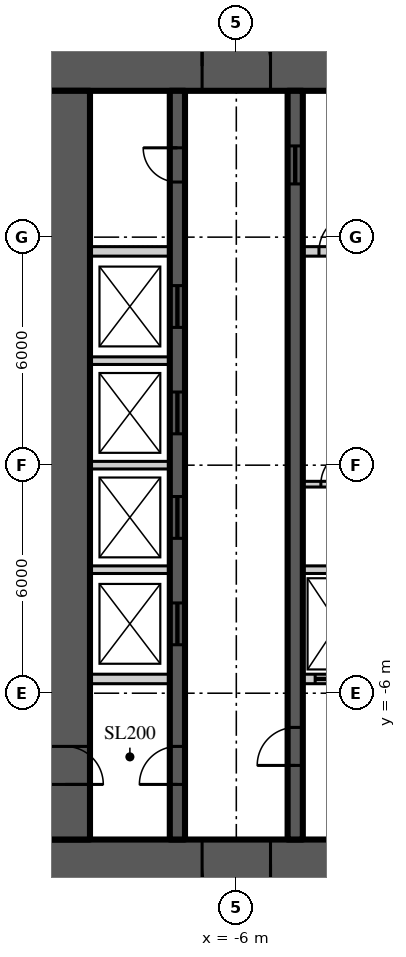
"""IFC4 building model, lengths in metres.
Left out: names, types, materials, properties, quantities, classifications, styles, units other than length and angle.
Written with IfcOpenShell. Run it as: python <this file> out.ifc"""

import sys

from ifc_helpers import new_model, si_unit, direction, frame, frame_2d, origin, place, context, subcontext, project, spatial, rectangle, extrude, element, fill, save


model = new_model("IFC4")
c1 = context("Model", 3, precision=1e-05, world=origin(), true_north=direction((0.0, 1.0)))
c2 = subcontext(c1, "Body", "Model", "MODEL_VIEW")
j1 = project(units=[si_unit("LENGTHUNIT", "METRE"), si_unit("PLANEANGLEUNIT", "RADIAN")], contexts=[c1])
p1 = place(None, origin())
s1 = spatial("IfcSite", under=j1, at=p1, CompositionType="ELEMENT")
p2 = place(p1, origin())
s2 = spatial("IfcBuilding", under=s1, at=p2, CompositionType="ELEMENT")
p3 = place(p2, frame((0.0, 0.0, 94.2)))
s3 = spatial("IfcBuildingStorey", under=s2, at=p3, CompositionType="ELEMENT", Elevation=94.2)
p4 = place(p3, frame((-11.15, 10.5, 0.0), z_axis=(0.0, 0.0, 1.0), x_axis=(1.0, 0.0, 0.0)))
e1 = element("IfcWall", 1, at=p4, inside=s3, PredefinedType="SHEAR", context=c2, shape_type="SweptSolid", body=[
    extrude(rectangle(XDim=22.3, YDim=1.3, at=frame_2d((11.15, 0.0))), origin(), (0.0, 0.0, 1.0), 3.9),
])
p5 = place(p4, frame((4.25, 0.0, 0.0)))
e2 = element("IfcOpeningElement", 2, at=p5, cuts=e1, PredefinedType="OPENING", context=c2, shape_type="SweptSolid", body=[
    extrude(rectangle(XDim=1.8, YDim=2.2, at=frame_2d((0.9, 1.1))), frame((0.0, 0.66, 0.0), z_axis=(0.0, -1.0, 0.0), x_axis=(1.0, 0.0, 0.0)), (0.0, 0.0, 1.0), 1.32),
])
p6 = place(p4, frame((16.25, 0.0, 0.0)))
e3 = element("IfcOpeningElement", 3, at=p6, cuts=e1, PredefinedType="OPENING", context=c2, shape_type="SweptSolid", body=[
    extrude(rectangle(XDim=1.8, YDim=2.2, at=frame_2d((0.9, 1.1))), frame((0.0, 0.66, 0.0), z_axis=(0.0, -1.0, 0.0), x_axis=(1.0, 0.0, 0.0)), (0.0, 0.0, 1.0), 1.32),
])
p7 = place(p3, frame((11.15, -10.5, 0.0), z_axis=(0.0, 0.0, 1.0), x_axis=(-1.0, 0.0, 0.0)))
e4 = element("IfcWall", 4, at=p7, inside=s3, PredefinedType="SHEAR", context=c2, shape_type="SweptSolid", body=[
    extrude(rectangle(XDim=22.3, YDim=1.3, at=frame_2d((11.15, 0.0))), origin(), (0.0, 0.0, 1.0), 3.9),
])
p8 = place(p7, frame((16.25, 0.0, 0.0)))
e5 = element("IfcOpeningElement", 5, at=p8, cuts=e4, PredefinedType="OPENING", context=c2, shape_type="SweptSolid", body=[
    extrude(rectangle(XDim=1.8, YDim=2.2, at=frame_2d((0.9, 1.1))), frame((0.0, 0.66, 0.0), z_axis=(0.0, -1.0, 0.0), x_axis=(1.0, 0.0, 0.0)), (0.0, 0.0, 1.0), 1.32),
])
p9 = place(p7, frame((4.25, 0.0, 0.0)))
e6 = element("IfcOpeningElement", 6, at=p9, cuts=e4, PredefinedType="OPENING", context=c2, shape_type="SweptSolid", body=[
    extrude(rectangle(XDim=1.8, YDim=2.2, at=frame_2d((0.9, 1.1))), frame((0.0, 0.66, 0.0), z_axis=(0.0, -1.0, 0.0), x_axis=(1.0, 0.0, 0.0)), (0.0, 0.0, 1.0), 1.32),
])
p10 = place(p3, frame((-10.5, 9.85, 0.0), z_axis=(0.0, 0.0, 1.0), x_axis=(0.0, -1.0, 0.0)))
e7 = element("IfcWall", 7, at=p10, inside=s3, PredefinedType="SHEAR", context=c2, shape_type="SweptSolid", body=[
    extrude(rectangle(XDim=19.7, YDim=1.3, at=frame_2d((9.85, 0.0))), origin(), (0.0, 0.0, 1.0), 3.9),
])
p11 = place(p10, frame((17.25, 0.0, 0.0)))
e8 = element("IfcOpeningElement", 8, at=p11, cuts=e7, PredefinedType="OPENING", context=c2, shape_type="SweptSolid", body=[
    extrude(rectangle(XDim=1.0, YDim=2.2, at=frame_2d((0.5, 1.1))), frame((0.0, 0.66, 0.0), z_axis=(0.0, -1.0, 0.0), x_axis=(1.0, 0.0, 0.0)), (0.0, 0.0, 1.0), 1.32),
])
p12 = place(p3, frame((-7.55, -9.85, 0.0), z_axis=(0.0, 0.0, 1.0), x_axis=(0.0, 1.0, 0.0)))
e9 = element("IfcWall", 9, at=p12, inside=s3, PredefinedType="SHEAR", context=c2, shape_type="SweptSolid", body=[
    extrude(rectangle(XDim=19.7, YDim=0.4, at=frame_2d((9.85, 0.0))), origin(), (0.0, 0.0, 1.0), 3.9),
])
p13 = place(p12, frame((1.45, 0.0, 0.0)))
e10 = element("IfcOpeningElement", 10, at=p13, cuts=e9, PredefinedType="OPENING", context=c2, shape_type="SweptSolid", body=[
    extrude(rectangle(XDim=1.0, YDim=2.2, at=frame_2d((0.5, 1.1))), frame((0.0, 0.21, 0.0), z_axis=(0.0, -1.0, 0.0), x_axis=(1.0, 0.0, 0.0)), (0.0, 0.0, 1.0), 0.42),
])
p14 = place(p12, frame((17.3, 0.0, 0.0)))
e11 = element("IfcOpeningElement", 11, at=p14, cuts=e9, PredefinedType="OPENING", context=c2, shape_type="SweptSolid", body=[
    extrude(rectangle(XDim=0.9, YDim=2.1, at=frame_2d((0.45, 1.05))), frame((0.0, 0.21, 0.0), z_axis=(0.0, -1.0, 0.0), x_axis=(1.0, 0.0, 0.0)), (0.0, 0.0, 1.0), 0.42),
])
p15 = place(p12, frame((5.125, 0.0, 0.0)))
e12 = element("IfcOpeningElement", 12, at=p15, cuts=e9, PredefinedType="OPENING", context=c2, shape_type="SweptSolid", body=[
    extrude(rectangle(XDim=1.1, YDim=2.2, at=frame_2d((0.55, 1.1))), frame((0.0, 0.21, 0.0), z_axis=(0.0, -1.0, 0.0), x_axis=(1.0, 0.0, 0.0)), (0.0, 0.0, 1.0), 0.42),
])
p16 = place(p12, frame((7.925, 0.0, 0.0)))
e13 = element("IfcOpeningElement", 13, at=p16, cuts=e9, PredefinedType="OPENING", context=c2, shape_type="SweptSolid", body=[
    extrude(rectangle(XDim=1.1, YDim=2.2, at=frame_2d((0.55, 1.1))), frame((0.0, 0.21, 0.0), z_axis=(0.0, -1.0, 0.0), x_axis=(1.0, 0.0, 0.0)), (0.0, 0.0, 1.0), 0.42),
])
p17 = place(p12, frame((10.675, 0.0, 0.0)))
e14 = element("IfcOpeningElement", 14, at=p17, cuts=e9, PredefinedType="OPENING", context=c2, shape_type="SweptSolid", body=[
    extrude(rectangle(XDim=1.1, YDim=2.2, at=frame_2d((0.55, 1.1))), frame((0.0, 0.21, 0.0), z_axis=(0.0, -1.0, 0.0), x_axis=(1.0, 0.0, 0.0)), (0.0, 0.0, 1.0), 0.42),
])
p18 = place(p12, frame((13.475, 0.0, 0.0)))
e15 = element("IfcOpeningElement", 15, at=p18, cuts=e9, PredefinedType="OPENING", context=c2, shape_type="SweptSolid", body=[
    extrude(rectangle(XDim=1.1, YDim=2.2, at=frame_2d((0.55, 1.1))), frame((0.0, 0.21, 0.0), z_axis=(0.0, -1.0, 0.0), x_axis=(1.0, 0.0, 0.0)), (0.0, 0.0, 1.0), 0.42),
])
p19 = place(p3, frame((-4.45, -9.85, 0.0), z_axis=(0.0, 0.0, 1.0), x_axis=(0.0, 1.0, 0.0)))
e16 = element("IfcWall", 16, at=p19, inside=s3, PredefinedType="SHEAR", context=c2, shape_type="SweptSolid", body=[
    extrude(rectangle(XDim=19.7, YDim=0.4, at=frame_2d((9.85, 0.0))), origin(), (0.0, 0.0, 1.0), 3.9),
])
p20 = place(p19, frame((1.95, 0.0, 0.0)))
e17 = element("IfcOpeningElement", 17, at=p20, cuts=e16, PredefinedType="OPENING", context=c2, shape_type="SweptSolid", body=[
    extrude(rectangle(XDim=1.0, YDim=2.2, at=frame_2d((0.5, 1.1))), frame((0.0, 0.21, 0.0), z_axis=(0.0, -1.0, 0.0), x_axis=(1.0, 0.0, 0.0)), (0.0, 0.0, 1.0), 0.42),
])
p21 = place(p19, frame((17.25, 0.0, 0.0)))
e18 = element("IfcOpeningElement", 18, at=p21, cuts=e16, PredefinedType="OPENING", context=c2, shape_type="SweptSolid", body=[
    extrude(rectangle(XDim=1.0, YDim=2.1, at=frame_2d((0.5, 1.05))), frame((0.0, 0.21, 0.0), z_axis=(0.0, -1.0, 0.0), x_axis=(1.0, 0.0, 0.0)), (0.0, 0.0, 1.0), 0.42),
])
p22 = place(p3, frame((-9.85, 5.625, 0.0), z_axis=(0.0, 0.0, 1.0), x_axis=(1.0, 0.0, 0.0)))
e19 = element("IfcWall", 19, at=p22, inside=s3, PredefinedType="SOLIDWALL", context=c2, shape_type="SweptSolid", body=[
    extrude(rectangle(XDim=2.1, YDim=0.25, at=frame_2d((1.05, 0.0))), origin(), (0.0, 0.0, 1.0), 3.7),
])
p23 = place(p3, frame((-4.25, 5.625, 0.0), z_axis=(0.0, 0.0, 1.0), x_axis=(1.0, 0.0, 0.0)))
e20 = element("IfcWall", 20, at=p23, inside=s3, PredefinedType="SOLIDWALL", context=c2, shape_type="SweptSolid", body=[
    extrude(rectangle(XDim=1.85, YDim=0.25, at=frame_2d((0.925, 0.0))), origin(), (0.0, 0.0, 1.0), 3.7),
])
p24 = place(p23, frame((0.425, 0.0, 0.0)))
e21 = element("IfcOpeningElement", 21, at=p24, cuts=e20, PredefinedType="OPENING", context=c2, shape_type="SweptSolid", body=[
    extrude(rectangle(XDim=1.0, YDim=2.2, at=frame_2d((0.5, 1.1))), frame((0.0, 0.135, 0.0), z_axis=(0.0, -1.0, 0.0), x_axis=(1.0, 0.0, 0.0)), (0.0, 0.0, 1.0), 0.27),
])
p25 = place(p3, frame((-9.85, -5.625, 0.0), z_axis=(0.0, 0.0, 1.0), x_axis=(1.0, 0.0, 0.0)))
e22 = element("IfcWall", 22, at=p25, inside=s3, PredefinedType="SOLIDWALL", context=c2, shape_type="SweptSolid", body=[
    extrude(rectangle(XDim=2.1, YDim=0.25, at=frame_2d((1.05, 0.0))), origin(), (0.0, 0.0, 1.0), 3.7),
])
p26 = place(p3, frame((-4.25, -5.625, 0.0), z_axis=(0.0, 0.0, 1.0), x_axis=(1.0, 0.0, 0.0)))
e23 = element("IfcWall", 23, at=p26, inside=s3, PredefinedType="SOLIDWALL", context=c2, shape_type="SweptSolid", body=[
    extrude(rectangle(XDim=1.85, YDim=0.25, at=frame_2d((0.925, 0.0))), origin(), (0.0, 0.0, 1.0), 3.7),
])
p27 = place(p26, frame((0.325, 0.0, 0.0)))
e24 = element("IfcOpeningElement", 24, at=p27, cuts=e23, PredefinedType="OPENING", context=c2, shape_type="SweptSolid", body=[
    extrude(rectangle(XDim=1.2, YDim=2.2, at=frame_2d((0.6, 1.1))), frame((0.0, 0.135, 0.0), z_axis=(0.0, -1.0, 0.0), x_axis=(1.0, 0.0, 0.0)), (0.0, 0.0, 1.0), 0.27),
])
p28 = place(p3, frame((-9.85, -2.75, 0.0), z_axis=(0.0, 0.0, 1.0), x_axis=(1.0, 0.0, 0.0)))
e25 = element("IfcWall", 25, at=p28, inside=s3, PredefinedType="SOLIDWALL", context=c2, shape_type="SweptSolid", body=[
    extrude(rectangle(XDim=2.1, YDim=0.2, at=frame_2d((1.05, 0.0))), origin(), (0.0, 0.0, 1.0), 3.7),
])
p29 = place(p3, frame((-4.25, -2.75, 0.0), z_axis=(0.0, 0.0, 1.0), x_axis=(1.0, 0.0, 0.0)))
e26 = element("IfcWall", 26, at=p29, inside=s3, PredefinedType="SOLIDWALL", context=c2, shape_type="SweptSolid", body=[
    extrude(rectangle(XDim=1.85, YDim=0.2, at=frame_2d((0.925, 0.0))), origin(), (0.0, 0.0, 1.0), 3.7),
])
for number, where, z_axis, x_axis in (
    (27, (-9.85, 0.0, 0.0), (0.0, 0.0, 1.0), (1.0, 0.0, 0.0)),
    (28, (-9.85, 2.75, 0.0), (0.0, 0.0, 1.0), (1.0, 0.0, 0.0)),
):
    element("IfcWall", number, at=place(p3, frame(where, z_axis=z_axis, x_axis=x_axis)), inside=s3, PredefinedType="SOLIDWALL", context=c2, shape_type="SweptSolid", body=[
        extrude(rectangle(XDim=2.1, YDim=0.2, at=frame_2d((1.05, 0.0))), origin(), (0.0, 0.0, 1.0), 3.7),
    ])
p30 = place(p3, frame((-4.25, -0.5, 0.0), z_axis=(0.0, 0.0, 1.0), x_axis=(1.0, 0.0, 0.0)))
e29 = element("IfcWall", 29, at=p30, inside=s3, PredefinedType="SOLIDWALL", context=c2, shape_type="SweptSolid", body=[
    extrude(rectangle(XDim=1.85, YDim=0.15, at=frame_2d((0.925, 0.0))), origin(), (0.0, 0.0, 1.0), 3.77),
])
p31 = place(p30, frame((0.475, 0.0, 0.0)))
e30 = element("IfcOpeningElement", 30, at=p31, cuts=e29, PredefinedType="OPENING", context=c2, shape_type="SweptSolid", body=[
    extrude(rectangle(XDim=0.9, YDim=2.1, at=frame_2d((0.45, 1.05))), frame((0.0, 0.085, 0.0), z_axis=(0.0, -1.0, 0.0), x_axis=(1.0, 0.0, 0.0)), (0.0, 0.0, 1.0), 0.17),
])
p32 = place(p5, origin())
e31 = element("IfcDoor", 31, at=p32, inside=s3, OperationType="DOUBLE_DOOR_DOUBLE_SWING", PredefinedType="DOOR", context=c2, shape_type="SweptSolid", body=[
    extrude(rectangle(XDim=1.8, YDim=2.2, at=frame_2d((0.9, 1.1))), frame((0.0, 0.025, 0.0), z_axis=(0.0, -1.0, 0.0), x_axis=(1.0, 0.0, 0.0)), (0.0, 0.0, 1.0), 0.05),
])
fill(e2, e31)
p33 = place(p8, origin())
e32 = element("IfcDoor", 32, at=p33, inside=s3, OperationType="DOUBLE_DOOR_DOUBLE_SWING", PredefinedType="DOOR", context=c2, shape_type="SweptSolid", body=[
    extrude(rectangle(XDim=1.8, YDim=2.2, at=frame_2d((0.9, 1.1))), frame((0.0, 0.025, 0.0), z_axis=(0.0, -1.0, 0.0), x_axis=(1.0, 0.0, 0.0)), (0.0, 0.0, 1.0), 0.05),
])
fill(e5, e32)
p34 = place(p13, origin())
e33 = element("IfcDoor", 33, at=p34, inside=s3, OperationType="SINGLE_SWING_LEFT", PredefinedType="DOOR", context=c2, shape_type="SweptSolid", body=[
    extrude(rectangle(XDim=1.0, YDim=2.2, at=frame_2d((0.5, 1.1))), frame((0.0, 0.025, 0.0), z_axis=(0.0, -1.0, 0.0), x_axis=(1.0, 0.0, 0.0)), (0.0, 0.0, 1.0), 0.05),
])
fill(e10, e33)
p35 = place(p11, origin())
e34 = element("IfcDoor", 34, at=p35, inside=s3, OperationType="SINGLE_SWING_RIGHT", PredefinedType="DOOR", context=c2, shape_type="SweptSolid", body=[
    extrude(rectangle(XDim=1.0, YDim=2.2, at=frame_2d((0.5, 1.1))), frame((0.0, 0.025, 0.0), z_axis=(0.0, -1.0, 0.0), x_axis=(1.0, 0.0, 0.0)), (0.0, 0.0, 1.0), 0.05),
])
fill(e8, e34)
p36 = place(p20, origin())
e35 = element("IfcDoor", 35, at=p36, inside=s3, OperationType="SINGLE_SWING_LEFT", PredefinedType="DOOR", context=c2, shape_type="SweptSolid", body=[
    extrude(rectangle(XDim=1.0, YDim=2.2, at=frame_2d((0.5, 1.1))), frame((0.0, 0.025, 0.0), z_axis=(0.0, -1.0, 0.0), x_axis=(1.0, 0.0, 0.0)), (0.0, 0.0, 1.0), 0.05),
])
fill(e17, e35)
p37 = place(p14, origin())
e36 = element("IfcDoor", 36, at=p37, inside=s3, OperationType="SINGLE_SWING_RIGHT", PredefinedType="DOOR", context=c2, shape_type="SweptSolid", body=[
    extrude(rectangle(XDim=0.9, YDim=2.1, at=frame_2d((0.45, 1.05))), frame((0.0, 0.025, 0.0), z_axis=(0.0, -1.0, 0.0), x_axis=(1.0, 0.0, 0.0)), (0.0, 0.0, 1.0), 0.05),
])
fill(e11, e36)
p38 = place(p21, origin())
e37 = element("IfcDoor", 37, at=p38, inside=s3, OperationType="SLIDING_TO_LEFT", PredefinedType="DOOR", context=c2, shape_type="SweptSolid", body=[
    extrude(rectangle(XDim=1.0, YDim=2.1, at=frame_2d((0.5, 1.05))), frame((0.0, 0.025, 0.0), z_axis=(0.0, -1.0, 0.0), x_axis=(1.0, 0.0, 0.0)), (0.0, 0.0, 1.0), 0.05),
])
fill(e18, e37)
p39 = place(p15, origin())
e38 = element("IfcDoor", 38, at=p39, inside=s3, OperationType="SLIDING_TO_LEFT", PredefinedType="DOOR", context=c2, shape_type="SweptSolid", body=[
    extrude(rectangle(XDim=1.1, YDim=2.2, at=frame_2d((0.55, 1.1))), frame((0.0, 0.025, 0.0), z_axis=(0.0, -1.0, 0.0), x_axis=(1.0, 0.0, 0.0)), (0.0, 0.0, 1.0), 0.05),
])
fill(e12, e38)
p40 = place(p16, origin())
e39 = element("IfcDoor", 39, at=p40, inside=s3, OperationType="SLIDING_TO_LEFT", PredefinedType="DOOR", context=c2, shape_type="SweptSolid", body=[
    extrude(rectangle(XDim=1.1, YDim=2.2, at=frame_2d((0.55, 1.1))), frame((0.0, 0.025, 0.0), z_axis=(0.0, -1.0, 0.0), x_axis=(1.0, 0.0, 0.0)), (0.0, 0.0, 1.0), 0.05),
])
fill(e13, e39)
p41 = place(p17, origin())
e40 = element("IfcDoor", 40, at=p41, inside=s3, OperationType="SLIDING_TO_LEFT", PredefinedType="DOOR", context=c2, shape_type="SweptSolid", body=[
    extrude(rectangle(XDim=1.1, YDim=2.2, at=frame_2d((0.55, 1.1))), frame((0.0, 0.025, 0.0), z_axis=(0.0, -1.0, 0.0), x_axis=(1.0, 0.0, 0.0)), (0.0, 0.0, 1.0), 0.05),
])
fill(e14, e40)
p42 = place(p18, origin())
e41 = element("IfcDoor", 41, at=p42, inside=s3, OperationType="SLIDING_TO_LEFT", PredefinedType="DOOR", context=c2, shape_type="SweptSolid", body=[
    extrude(rectangle(XDim=1.1, YDim=2.2, at=frame_2d((0.55, 1.1))), frame((0.0, 0.025, 0.0), z_axis=(0.0, -1.0, 0.0), x_axis=(1.0, 0.0, 0.0)), (0.0, 0.0, 1.0), 0.05),
])
fill(e15, e41)
p43 = place(p27, origin())
e42 = element("IfcDoor", 42, at=p43, inside=s3, OperationType="SLIDING_TO_LEFT", PredefinedType="DOOR", context=c2, shape_type="SweptSolid", body=[
    extrude(rectangle(XDim=1.2, YDim=2.2, at=frame_2d((0.6, 1.1))), frame((0.0, 0.025, 0.0), z_axis=(0.0, -1.0, 0.0), x_axis=(1.0, 0.0, 0.0)), (0.0, 0.0, 1.0), 0.05),
])
fill(e24, e42)
p44 = place(p31, origin())
e43 = element("IfcDoor", 43, at=p44, inside=s3, OperationType="SINGLE_SWING_RIGHT", PredefinedType="DOOR", context=c2, shape_type="SweptSolid", body=[
    extrude(rectangle(XDim=0.9, YDim=2.1, at=frame_2d((0.45, 1.05))), frame((0.0, 0.025, 0.0), z_axis=(0.0, -1.0, 0.0), x_axis=(1.0, 0.0, 0.0)), (0.0, 0.0, 1.0), 0.05),
])
fill(e30, e43)
p45 = place(p24, origin())
e44 = element("IfcDoor", 44, at=p45, inside=s3, OperationType="SINGLE_SWING_RIGHT", PredefinedType="DOOR", context=c2, shape_type="SweptSolid", body=[
    extrude(rectangle(XDim=1.0, YDim=2.2, at=frame_2d((0.5, 1.1))), frame((0.0, 0.025, 0.0), z_axis=(0.0, -1.0, 0.0), x_axis=(1.0, 0.0, 0.0)), (0.0, 0.0, 1.0), 0.05),
])
fill(e21, e44)
save(model, sys.argv[1])
